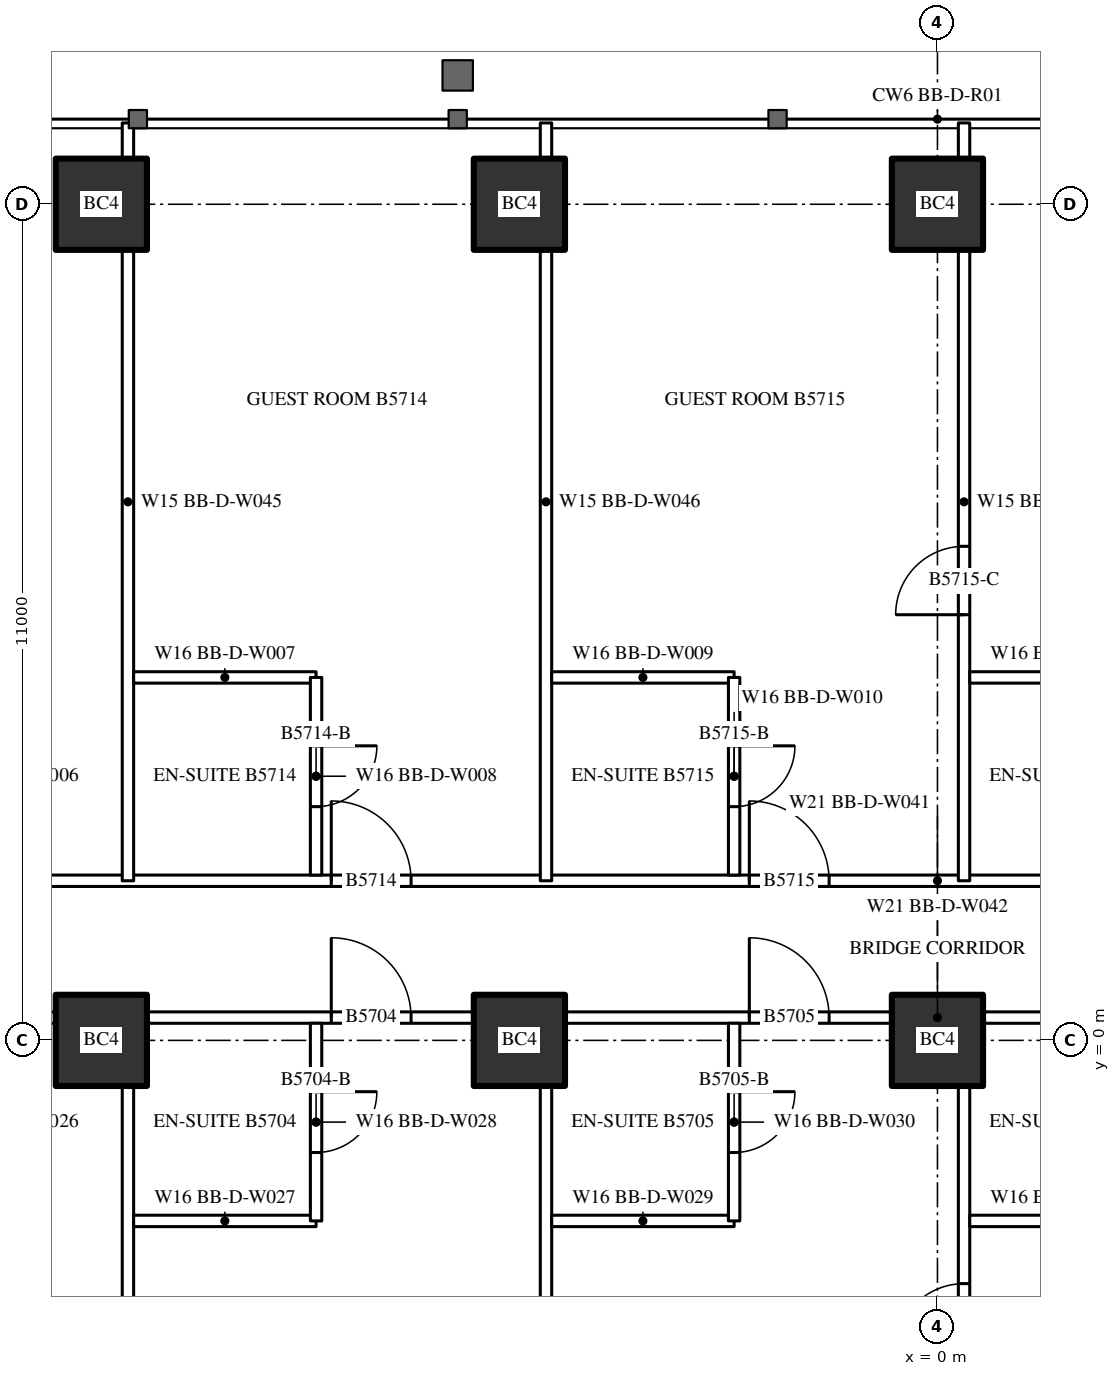
"""IFC4 building model, lengths in metres.
Left out: names, types, materials, properties, quantities, classifications, styles, units other than length and angle.
Written with IfcOpenShell. Run it as: python <this file> out.ifc"""

import sys

from ifc_helpers import new_model, si_unit, direction, frame, frame_2d, origin, origin_2d, place, context, subcontext, project, spatial, rectangle, hollow_rectangle, extrude, element, fill, save


model = new_model("IFC4")
c1 = context("Model", 3, precision=1e-05, world=origin(), true_north=direction((0.0, 1.0)))
c2 = subcontext(c1, "Body", "Model", "MODEL_VIEW")
j1 = project(units=[si_unit("LENGTHUNIT", "METRE"), si_unit("PLANEANGLEUNIT", "RADIAN")], contexts=[c1])
p1 = place(None, origin())
s1 = spatial("IfcSite", under=j1, at=p1, CompositionType="ELEMENT")
p2 = place(p1, origin())
s2 = spatial("IfcBuilding", under=s1, at=p2, CompositionType="ELEMENT")
p3 = place(p2, frame((0.0, 0.0, 215.3)))
s3 = spatial("IfcBuildingStorey", under=s2, at=p3, CompositionType="ELEMENT", Elevation=215.3)
for number, where, z_axis, x_axis in (
    (1, (-11.0, 0.0, 0.0), (0.0, 0.0, 1.0), (1.0, 0.0, 0.0)),
    (2, (-5.5, 0.0, 0.0), (0.0, 0.0, 1.0), (1.0, 0.0, 0.0)),
    (3, (0.0, 0.0, 0.0), (0.0, 0.0, 1.0), (1.0, 0.0, 0.0)),
    (4, (-11.0, 11.0, 0.0), (0.0, 0.0, 1.0), (1.0, 0.0, 0.0)),
    (5, (-5.5, 11.0, 0.0), (0.0, 0.0, 1.0), (1.0, 0.0, 0.0)),
    (6, (0.0, 11.0, 0.0), (0.0, 0.0, 1.0), (1.0, 0.0, 0.0)),
):
    element("IfcColumn", number, at=place(p3, frame(where, z_axis=z_axis, x_axis=x_axis)), inside=s3, PredefinedType="COLUMN", context=c2, shape_type="SweptSolid", body=[
        extrude(hollow_rectangle(XDim=1.2, YDim=1.2, WallThickness=0.12, at=origin_2d()), origin(), (0.0, 0.0, 1.0), 3.6),
    ])
p4 = place(p3, frame((-27.5, 0.3, 0.0), z_axis=(0.0, 0.0, 1.0), x_axis=(1.0, 0.0, 0.0)))
e7 = element("IfcWall", 7, at=p4, inside=s3, PredefinedType="PARTITIONING", context=c2, shape_type="SweptSolid", body=[
    extrude(rectangle(XDim=55.0, YDim=0.15, at=frame_2d((27.5, 0.0))), origin(), (0.0, 0.0, 1.0), 2.4),
])
p5 = place(p4, frame((1.575, 0.0, 0.0)))
e8 = element("IfcOpeningElement", 8, at=p5, cuts=e7, PredefinedType="OPENING", context=c2, shape_type="SweptSolid", body=[
    extrude(rectangle(XDim=1.0, YDim=2.2, at=frame_2d((0.5, 1.1))), frame((0.0, 0.085, 0.0), z_axis=(0.0, -1.0, 0.0), x_axis=(1.0, 0.0, 0.0)), (0.0, 0.0, 1.0), 0.17),
])
p6 = place(p4, frame((8.525, 0.0, 0.0)))
e9 = element("IfcOpeningElement", 9, at=p6, cuts=e7, PredefinedType="OPENING", context=c2, shape_type="SweptSolid", body=[
    extrude(rectangle(XDim=1.05, YDim=2.4, at=frame_2d((0.525, 1.2))), frame((0.0, 0.085, 0.0), z_axis=(0.0, -1.0, 0.0), x_axis=(1.0, 0.0, 0.0)), (0.0, 0.0, 1.0), 0.17),
])
p7 = place(p4, frame((14.025, 0.0, 0.0)))
e10 = element("IfcOpeningElement", 10, at=p7, cuts=e7, PredefinedType="OPENING", context=c2, shape_type="SweptSolid", body=[
    extrude(rectangle(XDim=1.05, YDim=2.4, at=frame_2d((0.525, 1.2))), frame((0.0, 0.085, 0.0), z_axis=(0.0, -1.0, 0.0), x_axis=(1.0, 0.0, 0.0)), (0.0, 0.0, 1.0), 0.17),
])
p8 = place(p4, frame((19.525, 0.0, 0.0)))
e11 = element("IfcOpeningElement", 11, at=p8, cuts=e7, PredefinedType="OPENING", context=c2, shape_type="SweptSolid", body=[
    extrude(rectangle(XDim=1.05, YDim=2.4, at=frame_2d((0.525, 1.2))), frame((0.0, 0.085, 0.0), z_axis=(0.0, -1.0, 0.0), x_axis=(1.0, 0.0, 0.0)), (0.0, 0.0, 1.0), 0.17),
])
p9 = place(p4, frame((25.025, 0.0, 0.0)))
e12 = element("IfcOpeningElement", 12, at=p9, cuts=e7, PredefinedType="OPENING", context=c2, shape_type="SweptSolid", body=[
    extrude(rectangle(XDim=1.05, YDim=2.4, at=frame_2d((0.525, 1.2))), frame((0.0, 0.085, 0.0), z_axis=(0.0, -1.0, 0.0), x_axis=(1.0, 0.0, 0.0)), (0.0, 0.0, 1.0), 0.17),
])
p10 = place(p4, frame((30.525, 0.0, 0.0)))
e13 = element("IfcOpeningElement", 13, at=p10, cuts=e7, PredefinedType="OPENING", context=c2, shape_type="SweptSolid", body=[
    extrude(rectangle(XDim=1.05, YDim=2.4, at=frame_2d((0.525, 1.2))), frame((0.0, 0.085, 0.0), z_axis=(0.0, -1.0, 0.0), x_axis=(1.0, 0.0, 0.0)), (0.0, 0.0, 1.0), 0.17),
])
p11 = place(p4, frame((36.025, 0.0, 0.0)))
e14 = element("IfcOpeningElement", 14, at=p11, cuts=e7, PredefinedType="OPENING", context=c2, shape_type="SweptSolid", body=[
    extrude(rectangle(XDim=1.05, YDim=2.4, at=frame_2d((0.525, 1.2))), frame((0.0, 0.085, 0.0), z_axis=(0.0, -1.0, 0.0), x_axis=(1.0, 0.0, 0.0)), (0.0, 0.0, 1.0), 0.17),
])
p12 = place(p4, frame((41.525, 0.0, 0.0)))
e15 = element("IfcOpeningElement", 15, at=p12, cuts=e7, PredefinedType="OPENING", context=c2, shape_type="SweptSolid", body=[
    extrude(rectangle(XDim=1.05, YDim=2.4, at=frame_2d((0.525, 1.2))), frame((0.0, 0.085, 0.0), z_axis=(0.0, -1.0, 0.0), x_axis=(1.0, 0.0, 0.0)), (0.0, 0.0, 1.0), 0.17),
])
p13 = place(p4, frame((47.025, 0.0, 0.0)))
e16 = element("IfcOpeningElement", 16, at=p13, cuts=e7, PredefinedType="OPENING", context=c2, shape_type="SweptSolid", body=[
    extrude(rectangle(XDim=1.05, YDim=2.4, at=frame_2d((0.525, 1.2))), frame((0.0, 0.085, 0.0), z_axis=(0.0, -1.0, 0.0), x_axis=(1.0, 0.0, 0.0)), (0.0, 0.0, 1.0), 0.17),
])
p14 = place(p4, frame((52.525, 0.0, 0.0)))
e17 = element("IfcOpeningElement", 17, at=p14, cuts=e7, PredefinedType="OPENING", context=c2, shape_type="SweptSolid", body=[
    extrude(rectangle(XDim=1.05, YDim=2.4, at=frame_2d((0.525, 1.2))), frame((0.0, 0.085, 0.0), z_axis=(0.0, -1.0, 0.0), x_axis=(1.0, 0.0, 0.0)), (0.0, 0.0, 1.0), 0.17),
])
p15 = place(p3, frame((-27.5, 2.1, 0.0), z_axis=(0.0, 0.0, 1.0), x_axis=(1.0, 0.0, 0.0)))
e18 = element("IfcWall", 18, at=p15, inside=s3, PredefinedType="PARTITIONING", context=c2, shape_type="SweptSolid", body=[
    extrude(rectangle(XDim=55.0, YDim=0.15, at=frame_2d((27.5, 0.0))), origin(), (0.0, 0.0, 1.0), 3.4),
])
p16 = place(p15, frame((2.025, 0.0, 0.0)))
e19 = element("IfcOpeningElement", 19, at=p16, cuts=e18, PredefinedType="OPENING", context=c2, shape_type="SweptSolid", body=[
    extrude(rectangle(XDim=1.05, YDim=2.4, at=frame_2d((0.525, 1.2))), frame((0.0, 0.085, 0.0), z_axis=(0.0, -1.0, 0.0), x_axis=(1.0, 0.0, 0.0)), (0.0, 0.0, 1.0), 0.17),
])
p17 = place(p15, frame((8.525, 0.0, 0.0)))
e20 = element("IfcOpeningElement", 20, at=p17, cuts=e18, PredefinedType="OPENING", context=c2, shape_type="SweptSolid", body=[
    extrude(rectangle(XDim=1.05, YDim=2.4, at=frame_2d((0.525, 1.2))), frame((0.0, 0.085, 0.0), z_axis=(0.0, -1.0, 0.0), x_axis=(1.0, 0.0, 0.0)), (0.0, 0.0, 1.0), 0.17),
])
p18 = place(p15, frame((14.025, 0.0, 0.0)))
e21 = element("IfcOpeningElement", 21, at=p18, cuts=e18, PredefinedType="OPENING", context=c2, shape_type="SweptSolid", body=[
    extrude(rectangle(XDim=1.05, YDim=2.4, at=frame_2d((0.525, 1.2))), frame((0.0, 0.085, 0.0), z_axis=(0.0, -1.0, 0.0), x_axis=(1.0, 0.0, 0.0)), (0.0, 0.0, 1.0), 0.17),
])
p19 = place(p15, frame((19.525, 0.0, 0.0)))
e22 = element("IfcOpeningElement", 22, at=p19, cuts=e18, PredefinedType="OPENING", context=c2, shape_type="SweptSolid", body=[
    extrude(rectangle(XDim=1.05, YDim=2.4, at=frame_2d((0.525, 1.2))), frame((0.0, 0.085, 0.0), z_axis=(0.0, -1.0, 0.0), x_axis=(1.0, 0.0, 0.0)), (0.0, 0.0, 1.0), 0.17),
])
p20 = place(p15, frame((25.025, 0.0, 0.0)))
e23 = element("IfcOpeningElement", 23, at=p20, cuts=e18, PredefinedType="OPENING", context=c2, shape_type="SweptSolid", body=[
    extrude(rectangle(XDim=1.05, YDim=2.4, at=frame_2d((0.525, 1.2))), frame((0.0, 0.085, 0.0), z_axis=(0.0, -1.0, 0.0), x_axis=(1.0, 0.0, 0.0)), (0.0, 0.0, 1.0), 0.17),
])
p21 = place(p15, frame((30.525, 0.0, 0.0)))
e24 = element("IfcOpeningElement", 24, at=p21, cuts=e18, PredefinedType="OPENING", context=c2, shape_type="SweptSolid", body=[
    extrude(rectangle(XDim=1.05, YDim=2.4, at=frame_2d((0.525, 1.2))), frame((0.0, 0.085, 0.0), z_axis=(0.0, -1.0, 0.0), x_axis=(1.0, 0.0, 0.0)), (0.0, 0.0, 1.0), 0.17),
])
p22 = place(p15, frame((36.025, 0.0, 0.0)))
e25 = element("IfcOpeningElement", 25, at=p22, cuts=e18, PredefinedType="OPENING", context=c2, shape_type="SweptSolid", body=[
    extrude(rectangle(XDim=1.05, YDim=2.4, at=frame_2d((0.525, 1.2))), frame((0.0, 0.085, 0.0), z_axis=(0.0, -1.0, 0.0), x_axis=(1.0, 0.0, 0.0)), (0.0, 0.0, 1.0), 0.17),
])
p23 = place(p15, frame((41.525, 0.0, 0.0)))
e26 = element("IfcOpeningElement", 26, at=p23, cuts=e18, PredefinedType="OPENING", context=c2, shape_type="SweptSolid", body=[
    extrude(rectangle(XDim=1.05, YDim=2.4, at=frame_2d((0.525, 1.2))), frame((0.0, 0.085, 0.0), z_axis=(0.0, -1.0, 0.0), x_axis=(1.0, 0.0, 0.0)), (0.0, 0.0, 1.0), 0.17),
])
p24 = place(p15, frame((47.025, 0.0, 0.0)))
e27 = element("IfcOpeningElement", 27, at=p24, cuts=e18, PredefinedType="OPENING", context=c2, shape_type="SweptSolid", body=[
    extrude(rectangle(XDim=1.05, YDim=2.4, at=frame_2d((0.525, 1.2))), frame((0.0, 0.085, 0.0), z_axis=(0.0, -1.0, 0.0), x_axis=(1.0, 0.0, 0.0)), (0.0, 0.0, 1.0), 0.17),
])
p25 = place(p15, frame((52.525, 0.0, 0.0)))
e28 = element("IfcOpeningElement", 28, at=p25, cuts=e18, PredefinedType="OPENING", context=c2, shape_type="SweptSolid", body=[
    extrude(rectangle(XDim=1.05, YDim=2.4, at=frame_2d((0.525, 1.2))), frame((0.0, 0.085, 0.0), z_axis=(0.0, -1.0, 0.0), x_axis=(1.0, 0.0, 0.0)), (0.0, 0.0, 1.0), 0.17),
])
for number, where, z_axis, x_axis in (
    (29, (-10.65, -12.07, 0.0), (0.0, 0.0, 1.0), (0.0, 1.0, 0.0)),
    (30, (-5.15, -12.07, 0.0), (0.0, 0.0, 1.0), (0.0, 1.0, 0.0)),
):
    element("IfcWall", number, at=place(p3, frame(where, z_axis=z_axis, x_axis=x_axis)), inside=s3, PredefinedType="PARTITIONING", context=c2, shape_type="SweptSolid", body=[
        extrude(rectangle(XDim=12.37, YDim=0.15, at=frame_2d((6.185, 0.0))), origin(), (0.0, 0.0, 1.0), 3.4),
    ])
p26 = place(p3, frame((0.35, -12.07, 0.0), z_axis=(0.0, 0.0, 1.0), x_axis=(0.0, 1.0, 0.0)))
e31 = element("IfcWall", 31, at=p26, inside=s3, PredefinedType="PARTITIONING", context=c2, shape_type="SweptSolid", body=[
    extrude(rectangle(XDim=12.37, YDim=0.15, at=frame_2d((6.185, 0.0))), origin(), (0.0, 0.0, 1.0), 3.4),
])
p27 = place(p26, frame((7.97, 0.0, 0.0)))
e32 = element("IfcOpeningElement", 32, at=p27, cuts=e31, PredefinedType="OPENING", context=c2, shape_type="SweptSolid", body=[
    extrude(rectangle(XDim=0.9, YDim=2.2, at=frame_2d((0.45, 1.1))), frame((0.0, 0.085, 0.0), z_axis=(0.0, -1.0, 0.0), x_axis=(1.0, 0.0, 0.0)), (0.0, 0.0, 1.0), 0.17),
])
p28 = place(p3, frame((-10.575, -2.375, 0.0), z_axis=(0.0, 0.0, 1.0), x_axis=(1.0, 0.0, 0.0)))
e33 = element("IfcWall", 33, at=p28, inside=s3, PredefinedType="PARTITIONING", context=c2, shape_type="SweptSolid", body=[
    extrude(rectangle(XDim=2.4, YDim=0.15, at=frame_2d((1.2, 0.0))), origin(), (0.0, 0.0, 1.0), 3.4),
])
p29 = place(p3, frame((-8.175, -2.375, 0.0), z_axis=(0.0, 0.0, 1.0), x_axis=(0.0, 1.0, 0.0)))
e34 = element("IfcWall", 34, at=p29, inside=s3, PredefinedType="PARTITIONING", context=c2, shape_type="SweptSolid", body=[
    extrude(rectangle(XDim=2.6, YDim=0.15, at=frame_2d((1.3, 0.0))), origin(), (0.0, 0.0, 1.0), 3.4),
])
p30 = place(p29, frame((0.9, 0.0, 0.0)))
e35 = element("IfcOpeningElement", 35, at=p30, cuts=e34, PredefinedType="OPENING", context=c2, shape_type="SweptSolid", body=[
    extrude(rectangle(XDim=0.8, YDim=2.2, at=frame_2d((0.4, 1.1))), frame((0.0, 0.085, 0.0), z_axis=(0.0, -1.0, 0.0), x_axis=(1.0, 0.0, 0.0)), (0.0, 0.0, 1.0), 0.17),
])
p31 = place(p3, frame((-5.075, -2.375, 0.0), z_axis=(0.0, 0.0, 1.0), x_axis=(1.0, 0.0, 0.0)))
e36 = element("IfcWall", 36, at=p31, inside=s3, PredefinedType="PARTITIONING", context=c2, shape_type="SweptSolid", body=[
    extrude(rectangle(XDim=2.4, YDim=0.15, at=frame_2d((1.2, 0.0))), origin(), (0.0, 0.0, 1.0), 3.4),
])
p32 = place(p3, frame((-2.675, -2.375, 0.0), z_axis=(0.0, 0.0, 1.0), x_axis=(0.0, 1.0, 0.0)))
e37 = element("IfcWall", 37, at=p32, inside=s3, PredefinedType="PARTITIONING", context=c2, shape_type="SweptSolid", body=[
    extrude(rectangle(XDim=2.6, YDim=0.15, at=frame_2d((1.3, 0.0))), origin(), (0.0, 0.0, 1.0), 3.4),
])
p33 = place(p32, frame((0.9, 0.0, 0.0)))
e38 = element("IfcOpeningElement", 38, at=p33, cuts=e37, PredefinedType="OPENING", context=c2, shape_type="SweptSolid", body=[
    extrude(rectangle(XDim=0.8, YDim=2.2, at=frame_2d((0.4, 1.1))), frame((0.0, 0.085, 0.0), z_axis=(0.0, -1.0, 0.0), x_axis=(1.0, 0.0, 0.0)), (0.0, 0.0, 1.0), 0.17),
])
p34 = place(p3, frame((0.425, -2.375, 0.0), z_axis=(0.0, 0.0, 1.0), x_axis=(1.0, 0.0, 0.0)))
e39 = element("IfcWall", 39, at=p34, inside=s3, PredefinedType="PARTITIONING", context=c2, shape_type="SweptSolid", body=[
    extrude(rectangle(XDim=2.4, YDim=0.15, at=frame_2d((1.2, 0.0))), origin(), (0.0, 0.0, 1.0), 3.4),
])
for number, where, z_axis, x_axis in (
    (40, (-10.65, 2.1, 0.0), (0.0, 0.0, 1.0), (0.0, 1.0, 0.0)),
    (41, (-5.15, 2.1, 0.0), (0.0, 0.0, 1.0), (0.0, 1.0, 0.0)),
):
    element("IfcWall", number, at=place(p3, frame(where, z_axis=z_axis, x_axis=x_axis)), inside=s3, PredefinedType="PARTITIONING", context=c2, shape_type="SweptSolid", body=[
        extrude(rectangle(XDim=9.97, YDim=0.15, at=frame_2d((4.985, 0.0))), origin(), (0.0, 0.0, 1.0), 3.4),
    ])
p35 = place(p3, frame((0.35, 2.1, 0.0), z_axis=(0.0, 0.0, 1.0), x_axis=(0.0, 1.0, 0.0)))
e42 = element("IfcWall", 42, at=p35, inside=s3, PredefinedType="PARTITIONING", context=c2, shape_type="SweptSolid", body=[
    extrude(rectangle(XDim=9.97, YDim=0.15, at=frame_2d((4.985, 0.0))), origin(), (0.0, 0.0, 1.0), 3.4),
])
p36 = place(p35, frame((3.5, 0.0, 0.0)))
e43 = element("IfcOpeningElement", 43, at=p36, cuts=e42, PredefinedType="OPENING", context=c2, shape_type="SweptSolid", body=[
    extrude(rectangle(XDim=0.9, YDim=2.2, at=frame_2d((0.45, 1.1))), frame((0.0, 0.085, 0.0), z_axis=(0.0, -1.0, 0.0), x_axis=(1.0, 0.0, 0.0)), (0.0, 0.0, 1.0), 0.17),
])
p37 = place(p3, frame((-10.575, 4.775, 0.0), z_axis=(0.0, 0.0, 1.0), x_axis=(1.0, 0.0, 0.0)))
e44 = element("IfcWall", 44, at=p37, inside=s3, PredefinedType="PARTITIONING", context=c2, shape_type="SweptSolid", body=[
    extrude(rectangle(XDim=2.4, YDim=0.15, at=frame_2d((1.2, 0.0))), origin(), (0.0, 0.0, 1.0), 3.4),
])
p38 = place(p3, frame((-8.175, 2.175, 0.0), z_axis=(0.0, 0.0, 1.0), x_axis=(0.0, 1.0, 0.0)))
e45 = element("IfcWall", 45, at=p38, inside=s3, PredefinedType="PARTITIONING", context=c2, shape_type="SweptSolid", body=[
    extrude(rectangle(XDim=2.6, YDim=0.15, at=frame_2d((1.3, 0.0))), origin(), (0.0, 0.0, 1.0), 3.4),
])
p39 = place(p38, frame((0.9, 0.0, 0.0)))
e46 = element("IfcOpeningElement", 46, at=p39, cuts=e45, PredefinedType="OPENING", context=c2, shape_type="SweptSolid", body=[
    extrude(rectangle(XDim=0.8, YDim=2.2, at=frame_2d((0.4, 1.1))), frame((0.0, 0.085, 0.0), z_axis=(0.0, -1.0, 0.0), x_axis=(1.0, 0.0, 0.0)), (0.0, 0.0, 1.0), 0.17),
])
p40 = place(p3, frame((-5.075, 4.775, 0.0), z_axis=(0.0, 0.0, 1.0), x_axis=(1.0, 0.0, 0.0)))
e47 = element("IfcWall", 47, at=p40, inside=s3, PredefinedType="PARTITIONING", context=c2, shape_type="SweptSolid", body=[
    extrude(rectangle(XDim=2.4, YDim=0.15, at=frame_2d((1.2, 0.0))), origin(), (0.0, 0.0, 1.0), 3.4),
])
p41 = place(p3, frame((-2.675, 2.175, 0.0), z_axis=(0.0, 0.0, 1.0), x_axis=(0.0, 1.0, 0.0)))
e48 = element("IfcWall", 48, at=p41, inside=s3, PredefinedType="PARTITIONING", context=c2, shape_type="SweptSolid", body=[
    extrude(rectangle(XDim=2.6, YDim=0.15, at=frame_2d((1.3, 0.0))), origin(), (0.0, 0.0, 1.0), 3.4),
])
p42 = place(p41, frame((0.9, 0.0, 0.0)))
e49 = element("IfcOpeningElement", 49, at=p42, cuts=e48, PredefinedType="OPENING", context=c2, shape_type="SweptSolid", body=[
    extrude(rectangle(XDim=0.8, YDim=2.2, at=frame_2d((0.4, 1.1))), frame((0.0, 0.085, 0.0), z_axis=(0.0, -1.0, 0.0), x_axis=(1.0, 0.0, 0.0)), (0.0, 0.0, 1.0), 0.17),
])
p43 = place(p3, frame((0.425, 4.775, 0.0), z_axis=(0.0, 0.0, 1.0), x_axis=(1.0, 0.0, 0.0)))
e50 = element("IfcWall", 50, at=p43, inside=s3, PredefinedType="PARTITIONING", context=c2, shape_type="SweptSolid", body=[
    extrude(rectangle(XDim=2.4, YDim=0.15, at=frame_2d((1.2, 0.0))), origin(), (0.0, 0.0, 1.0), 3.4),
])
p44 = place(p30, origin())
e51 = element("IfcDoor", 51, at=p44, inside=s3, OperationType="SINGLE_SWING_RIGHT", PredefinedType="DOOR", context=c2, shape_type="SweptSolid", body=[
    extrude(rectangle(XDim=0.8, YDim=2.2, at=frame_2d((0.4, 1.1))), frame((0.0, 0.025, 0.0), z_axis=(0.0, -1.0, 0.0), x_axis=(1.0, 0.0, 0.0)), (0.0, 0.0, 1.0), 0.05),
])
fill(e35, e51)
p45 = place(p8, origin())
e52 = element("IfcDoor", 52, at=p45, inside=s3, OperationType="SINGLE_SWING_LEFT", PredefinedType="DOOR", context=c2, shape_type="SweptSolid", body=[
    extrude(rectangle(XDim=1.05, YDim=2.4, at=frame_2d((0.525, 1.2))), frame((0.0, 0.025, 0.0), z_axis=(0.0, -1.0, 0.0), x_axis=(1.0, 0.0, 0.0)), (0.0, 0.0, 1.0), 0.05),
])
fill(e11, e52)
p46 = place(p33, origin())
e53 = element("IfcDoor", 53, at=p46, inside=s3, OperationType="SINGLE_SWING_RIGHT", PredefinedType="DOOR", context=c2, shape_type="SweptSolid", body=[
    extrude(rectangle(XDim=0.8, YDim=2.2, at=frame_2d((0.4, 1.1))), frame((0.0, 0.025, 0.0), z_axis=(0.0, -1.0, 0.0), x_axis=(1.0, 0.0, 0.0)), (0.0, 0.0, 1.0), 0.05),
])
fill(e38, e53)
p47 = place(p9, origin())
e54 = element("IfcDoor", 54, at=p47, inside=s3, OperationType="SINGLE_SWING_LEFT", PredefinedType="DOOR", context=c2, shape_type="SweptSolid", body=[
    extrude(rectangle(XDim=1.05, YDim=2.4, at=frame_2d((0.525, 1.2))), frame((0.0, 0.025, 0.0), z_axis=(0.0, -1.0, 0.0), x_axis=(1.0, 0.0, 0.0)), (0.0, 0.0, 1.0), 0.05),
])
fill(e12, e54)
p48 = place(p39, origin())
e55 = element("IfcDoor", 55, at=p48, inside=s3, OperationType="SINGLE_SWING_RIGHT", PredefinedType="DOOR", context=c2, shape_type="SweptSolid", body=[
    extrude(rectangle(XDim=0.8, YDim=2.2, at=frame_2d((0.4, 1.1))), frame((0.0, 0.025, 0.0), z_axis=(0.0, -1.0, 0.0), x_axis=(1.0, 0.0, 0.0)), (0.0, 0.0, 1.0), 0.05),
])
fill(e46, e55)
p49 = place(p19, origin())
e56 = element("IfcDoor", 56, at=p49, inside=s3, OperationType="SINGLE_SWING_LEFT", PredefinedType="DOOR", context=c2, shape_type="SweptSolid", body=[
    extrude(rectangle(XDim=1.05, YDim=2.4, at=frame_2d((0.525, 1.2))), frame((0.0, 0.025, 0.0), z_axis=(0.0, -1.0, 0.0), x_axis=(1.0, 0.0, 0.0)), (0.0, 0.0, 1.0), 0.05),
])
fill(e22, e56)
p50 = place(p42, origin())
e57 = element("IfcDoor", 57, at=p50, inside=s3, OperationType="SINGLE_SWING_RIGHT", PredefinedType="DOOR", context=c2, shape_type="SweptSolid", body=[
    extrude(rectangle(XDim=0.8, YDim=2.2, at=frame_2d((0.4, 1.1))), frame((0.0, 0.025, 0.0), z_axis=(0.0, -1.0, 0.0), x_axis=(1.0, 0.0, 0.0)), (0.0, 0.0, 1.0), 0.05),
])
fill(e49, e57)
p51 = place(p20, origin())
e58 = element("IfcDoor", 58, at=p51, inside=s3, OperationType="SINGLE_SWING_LEFT", PredefinedType="DOOR", context=c2, shape_type="SweptSolid", body=[
    extrude(rectangle(XDim=1.05, YDim=2.4, at=frame_2d((0.525, 1.2))), frame((0.0, 0.025, 0.0), z_axis=(0.0, -1.0, 0.0), x_axis=(1.0, 0.0, 0.0)), (0.0, 0.0, 1.0), 0.05),
])
fill(e23, e58)
p52 = place(p27, origin())
e59 = element("IfcDoor", 59, at=p52, inside=s3, OperationType="SINGLE_SWING_LEFT", PredefinedType="DOOR", context=c2, shape_type="SweptSolid", body=[
    extrude(rectangle(XDim=0.9, YDim=2.2, at=frame_2d((0.45, 1.1))), frame((0.0, 0.025, 0.0), z_axis=(0.0, -1.0, 0.0), x_axis=(1.0, 0.0, 0.0)), (0.0, 0.0, 1.0), 0.05),
])
fill(e32, e59)
p53 = place(p36, origin())
e60 = element("IfcDoor", 60, at=p53, inside=s3, OperationType="SINGLE_SWING_LEFT", PredefinedType="DOOR", context=c2, shape_type="SweptSolid", body=[
    extrude(rectangle(XDim=0.9, YDim=2.2, at=frame_2d((0.45, 1.1))), frame((0.0, 0.025, 0.0), z_axis=(0.0, -1.0, 0.0), x_axis=(1.0, 0.0, 0.0)), (0.0, 0.0, 1.0), 0.05),
])
fill(e43, e60)
save(model, sys.argv[1])
